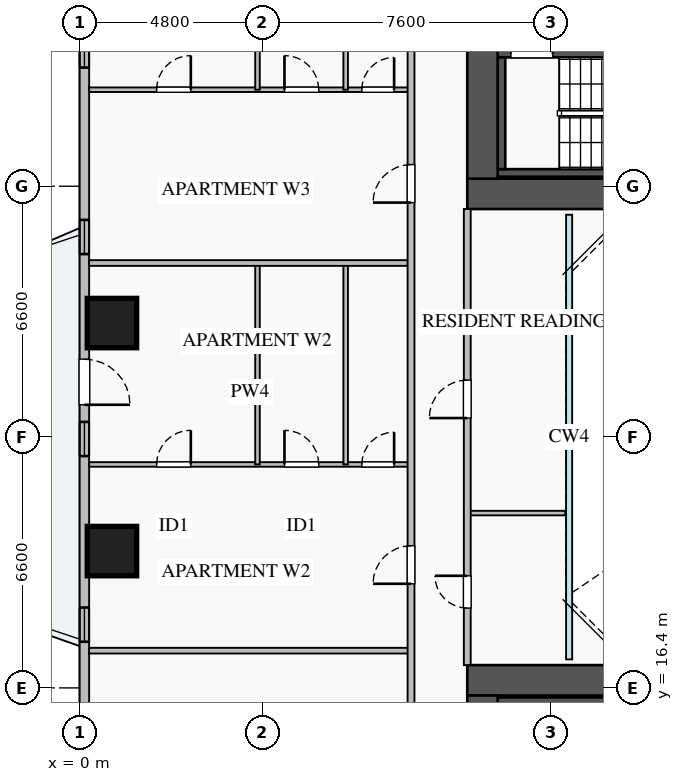
"""IFC4 building model, lengths in metres.
Left out: names, types, materials, properties, quantities, classifications, styles, units other than length and angle.
Written with IfcOpenShell. Run it as: python <this file> out.ifc"""

import sys

from ifc_helpers import new_model, si_unit, direction, frame, frame_2d, origin, origin_2d, place, context, subcontext, project, spatial, rectangle, extrude, source, transform, mapped, element, fill, save


model = new_model("IFC4")
c1 = context("Model", 3, precision=1e-05, world=origin(), true_north=direction((0.0, 1.0)))
c2 = subcontext(c1, "Body", "Model", "MODEL_VIEW")
j1 = project(units=[si_unit("LENGTHUNIT", "METRE"), si_unit("PLANEANGLEUNIT", "RADIAN")], contexts=[c1])
p1 = place(None, origin())
s1 = spatial("IfcSite", under=j1, at=p1, CompositionType="ELEMENT")
p2 = place(p1, origin())
s2 = spatial("IfcBuilding", under=s1, at=p2, CompositionType="ELEMENT")
p3 = place(p2, frame((0.0, 0.0, 42.5)))
s3 = spatial("IfcBuildingStorey", under=s2, at=p3, CompositionType="ELEMENT", Elevation=42.5)
p4 = place(p3, frame((12.68, 33.2, 0.0), z_axis=(0.0, 0.0, 1.0), x_axis=(1.0, 0.0, 0.0)))
e1 = element("IfcWall", 1, at=p4, inside=s3, PredefinedType="SHEAR", context=c2, shape_type="SweptSolid", body=[
    extrude(rectangle(XDim=1.94, YDim=0.18, at=frame_2d((0.97, 0.0))), origin(), (0.0, 0.0, 1.0), 3.03),
])
p5 = place(p3, frame((11.0, 29.95, 0.0), z_axis=(0.0, 0.0, 1.0), x_axis=(1.0, 0.0, 0.0)))
e2 = element("IfcWall", 2, at=p5, inside=s3, PredefinedType="SHEAR", context=c2, shape_type="SweptSolid", body=[
    extrude(rectangle(XDim=7.15, YDim=0.2, at=frame_2d((3.575, 0.0))), origin(), (0.0, 0.0, 1.0), 3.25),
])
p6 = place(p3, frame((11.0, 33.09, 0.0), z_axis=(0.0, 0.0, 1.0), x_axis=(1.0, 0.0, 0.0)))
e3 = element("IfcWall", 3, at=p6, inside=s3, PredefinedType="SHEAR", context=c2, shape_type="SweptSolid", body=[
    extrude(rectangle(XDim=7.15, YDim=0.2, at=frame_2d((3.575, 0.0))), origin(), (0.0, 0.0, 1.0), 3.25),
])
p7 = place(p6, frame((0.35, 0.0, 0.0)))
e4 = element("IfcOpeningElement", 4, at=p7, cuts=e3, PredefinedType="OPENING", context=c2, shape_type="SweptSolid", body=[
    extrude(rectangle(XDim=1.1, YDim=2.05, at=frame_2d((0.55, 1.025))), frame((0.0, 0.11, 0.0), z_axis=(0.0, -1.0, 0.0), x_axis=(1.0, 0.0, 0.0)), (0.0, 0.0, 1.0), 0.22),
])
p8 = place(p3, frame((11.1, 30.05, 0.0), z_axis=(0.0, 0.0, 1.0), x_axis=(0.0, 1.0, 0.0)))
e5 = element("IfcWall", 5, at=p8, inside=s3, PredefinedType="SHEAR", context=c2, shape_type="SweptSolid", body=[
    extrude(rectangle(XDim=2.94, YDim=0.2, at=frame_2d((1.47, 0.0))), origin(), (0.0, 0.0, 1.0), 3.25),
])
p9 = place(p3, frame((11.0, 16.05, 0.0), z_axis=(0.0, 0.0, 1.0), x_axis=(1.0, 0.0, 0.0)))
e6 = element("IfcWall", 6, at=p9, inside=s3, PredefinedType="SHEAR", context=c2, shape_type="SweptSolid", body=[
    extrude(rectangle(XDim=7.15, YDim=0.2, at=frame_2d((3.575, 0.0))), origin(), (0.0, 0.0, 1.0), 3.25),
])
p10 = place(p3, frame((10.2, 29.4, 0.0), z_axis=(0.0, 0.0, 1.0), x_axis=(1.0, 0.0, 0.0)))
e7 = element("IfcWall", 7, at=p10, inside=s3, PredefinedType="SHEAR", context=c2, shape_type="SweptSolid", body=[
    extrude(rectangle(XDim=17.6, YDim=0.8, at=frame_2d((8.8, 0.0))), origin(), (0.0, 0.0, 1.0), 3.25),
])
p11 = place(p3, frame((10.6, 29.8, 0.0), z_axis=(0.0, 0.0, 1.0), x_axis=(0.0, 1.0, 0.0)))
e8 = element("IfcWall", 8, at=p11, inside=s3, PredefinedType="SHEAR", context=c2, shape_type="SweptSolid", body=[
    extrude(rectangle(XDim=5.6, YDim=0.8, at=frame_2d((2.8, 0.0))), origin(), (0.0, 0.0, 1.0), 3.25),
])
p12 = place(p3, frame((10.2, 16.6, 0.0), z_axis=(0.0, 0.0, 1.0), x_axis=(1.0, 0.0, 0.0)))
e9 = element("IfcWall", 9, at=p12, inside=s3, PredefinedType="SHEAR", context=c2, shape_type="SweptSolid", body=[
    extrude(rectangle(XDim=17.6, YDim=0.8, at=frame_2d((8.8, 0.0))), origin(), (0.0, 0.0, 1.0), 3.25),
])
p13 = place(p3, frame((10.6, 10.6, 0.0), z_axis=(0.0, 0.0, 1.0), x_axis=(0.0, 1.0, 0.0)))
e10 = element("IfcWall", 10, at=p13, inside=s3, PredefinedType="SHEAR", context=c2, shape_type="SweptSolid", body=[
    extrude(rectangle(XDim=5.6, YDim=0.8, at=frame_2d((2.8, 0.0))), origin(), (0.0, 0.0, 1.0), 3.25),
])
m1 = source(origin(), c2, "Body", "SweptSolid", [
    extrude(rectangle(XDim=1.3, YDim=1.3, at=origin_2d()), origin(), (0.0, 0.0, 1.0), 3.25),
])
for number, where, z_axis, x_axis in (
    (11, (0.85, 26.0, 0.0), (0.0, 0.0, 1.0), (1.0, 0.0, 0.0)),
    (12, (0.85, 20.0, 0.0), (0.0, 0.0, 1.0), (1.0, 0.0, 0.0)),
):
    element("IfcColumn", number, at=place(p3, frame(where, z_axis=z_axis, x_axis=x_axis)), inside=s3, PredefinedType="COLUMN", context=c2, shape_type="MappedRepresentation", body=[
        mapped(m1, transform((0.0, 0.0, 0.0), x_axis=(1.0, 0.0, 0.0), y_axis=(0.0, 1.0, 0.0), z_axis=(0.0, 0.0, 1.0), scale=1.0)),
    ])
p14 = place(p3, frame((0.125, 9.45, 0.0), z_axis=(0.0, 0.0, 1.0), x_axis=(0.0, 1.0, 0.0)))
e13 = element("IfcWall", 13, at=p14, inside=s3, PredefinedType="STANDARD", context=c2, shape_type="SweptSolid", body=[
    extrude(rectangle(XDim=27.1, YDim=0.25, at=frame_2d((13.55, 0.0))), origin(), (0.0, 0.0, 1.0), 2.57),
])
p15 = place(p14, frame((14.4, 0.0, 0.0)))
e14 = element("IfcOpeningElement", 14, at=p15, cuts=e13, PredefinedType="OPENING", context=c2, shape_type="SweptSolid", body=[
    extrude(rectangle(XDim=1.2, YDim=2.1, at=frame_2d((0.6, 1.05))), frame((0.0, 0.135, 0.0), z_axis=(0.0, -1.0, 0.0), x_axis=(1.0, 0.0, 0.0)), (0.0, 0.0, 1.0), 0.27),
])
p16 = place(p14, frame((2.188, 0.0, 0.9)))
e15 = element("IfcOpeningElement", 15, at=p16, cuts=e13, PredefinedType="OPENING", context=c2, shape_type="SweptSolid", body=[
    extrude(rectangle(XDim=2.4, YDim=1.48, at=frame_2d((1.2, 0.74))), frame((0.0, 0.135, 0.0), z_axis=(0.0, -1.0, 0.0), x_axis=(1.0, 0.0, 0.0)), (0.0, 0.0, 1.0), 0.27),
])
p17 = place(p14, frame((23.272, 0.0, 0.9)))
e16 = element("IfcOpeningElement", 16, at=p17, cuts=e13, PredefinedType="OPENING", context=c2, shape_type="SweptSolid", body=[
    extrude(rectangle(XDim=2.1, YDim=1.5, at=frame_2d((1.05, 0.75))), frame((0.0, 0.135, 0.0), z_axis=(0.0, -1.0, 0.0), x_axis=(1.0, 0.0, 0.0)), (0.0, 0.0, 1.0), 0.27),
])
p18 = place(p14, frame((13.05, 0.0, 0.9)))
e17 = element("IfcOpeningElement", 17, at=p18, cuts=e13, PredefinedType="OPENING", context=c2, shape_type="SweptSolid", body=[
    extrude(rectangle(XDim=0.9, YDim=1.2, at=frame_2d((0.45, 0.6))), frame((0.0, 0.135, 0.0), z_axis=(0.0, -1.0, 0.0), x_axis=(1.0, 0.0, 0.0)), (0.0, 0.0, 1.0), 0.27),
])
p19 = place(p14, frame((8.165, 0.0, 0.9)))
e18 = element("IfcOpeningElement", 18, at=p19, cuts=e13, PredefinedType="OPENING", context=c2, shape_type="SweptSolid", body=[
    extrude(rectangle(XDim=0.9, YDim=1.2, at=frame_2d((0.45, 0.6))), frame((0.0, 0.135, 0.0), z_axis=(0.0, -1.0, 0.0), x_axis=(1.0, 0.0, 0.0)), (0.0, 0.0, 1.0), 0.27),
])
p20 = place(p14, frame((18.365, 0.0, 0.9)))
e19 = element("IfcOpeningElement", 19, at=p20, cuts=e13, PredefinedType="OPENING", context=c2, shape_type="SweptSolid", body=[
    extrude(rectangle(XDim=0.9, YDim=1.2, at=frame_2d((0.45, 0.6))), frame((0.0, 0.135, 0.0), z_axis=(0.0, -1.0, 0.0), x_axis=(1.0, 0.0, 0.0)), (0.0, 0.0, 1.0), 0.27),
])
p21 = place(p3, frame((0.25, 22.28, 0.0), z_axis=(0.0, 0.0, 1.0), x_axis=(1.0, 0.0, 0.0)))
e20 = element("IfcWall", 20, at=p21, inside=s3, PredefinedType="PLUMBINGWALL", context=c2, shape_type="SweptSolid", body=[
    extrude(rectangle(XDim=8.47, YDim=0.12, at=frame_2d((4.235, 0.0))), origin(), (0.0, 0.0, 1.0), 3.03),
])
p22 = place(p21, frame((1.775, 0.0, 0.0)))
e21 = element("IfcOpeningElement", 21, at=p22, cuts=e20, PredefinedType="OPENING", context=c2, shape_type="SweptSolid", body=[
    extrude(rectangle(XDim=0.9, YDim=2.05, at=frame_2d((0.45, 1.025))), frame((0.0, 0.07, 0.0), z_axis=(0.0, -1.0, 0.0), x_axis=(1.0, 0.0, 0.0)), (0.0, 0.0, 1.0), 0.14),
])
p23 = place(p21, frame((5.14, 0.0, 0.0)))
e22 = element("IfcOpeningElement", 22, at=p23, cuts=e20, PredefinedType="OPENING", context=c2, shape_type="SweptSolid", body=[
    extrude(rectangle(XDim=0.9, YDim=2.05, at=frame_2d((0.45, 1.025))), frame((0.0, 0.07, 0.0), z_axis=(0.0, -1.0, 0.0), x_axis=(1.0, 0.0, 0.0)), (0.0, 0.0, 1.0), 0.14),
])
p24 = place(p21, frame((7.175, 0.0, 0.0)))
e23 = element("IfcOpeningElement", 23, at=p24, cuts=e20, PredefinedType="OPENING", context=c2, shape_type="SweptSolid", body=[
    extrude(rectangle(XDim=0.85, YDim=2.05, at=frame_2d((0.425, 1.025))), frame((0.0, 0.07, 0.0), z_axis=(0.0, -1.0, 0.0), x_axis=(1.0, 0.0, 0.0)), (0.0, 0.0, 1.0), 0.14),
])
for number, where, z_axis, x_axis in (
    (24, (4.68, 22.28, 0.0), (0.0, 0.0, 1.0), (0.0, 1.0, 0.0)),
    (25, (7.0, 22.28, 0.0), (0.0, 0.0, 1.0), (0.0, 1.0, 0.0)),
):
    element("IfcWall", number, at=place(p3, frame(where, z_axis=z_axis, x_axis=x_axis)), inside=s3, PredefinedType="PLUMBINGWALL", context=c2, shape_type="SweptSolid", body=[
        extrude(rectangle(XDim=5.3, YDim=0.12, at=frame_2d((2.65, 0.0))), origin(), (0.0, 0.0, 1.0), 3.03),
    ])
p25 = place(p3, frame((0.25, 17.38, 0.0), z_axis=(0.0, 0.0, 1.0), x_axis=(1.0, 0.0, 0.0)))
e26 = element("IfcWall", 26, at=p25, inside=s3, PredefinedType="PARTITIONING", context=c2, shape_type="SweptSolid", body=[
    extrude(rectangle(XDim=8.47, YDim=0.15, at=frame_2d((4.235, 0.0))), origin(), (0.0, 0.0, 1.0), 3.03),
])
p26 = place(p3, frame((0.25, 32.14, 0.0), z_axis=(0.0, 0.0, 1.0), x_axis=(1.0, 0.0, 0.0)))
e27 = element("IfcWall", 27, at=p26, inside=s3, PredefinedType="PLUMBINGWALL", context=c2, shape_type="SweptSolid", body=[
    extrude(rectangle(XDim=8.47, YDim=0.12, at=frame_2d((4.235, 0.0))), origin(), (0.0, 0.0, 1.0), 3.03),
])
p27 = place(p26, frame((1.775, 0.0, 0.0)))
e28 = element("IfcOpeningElement", 28, at=p27, cuts=e27, PredefinedType="OPENING", context=c2, shape_type="SweptSolid", body=[
    extrude(rectangle(XDim=0.9, YDim=2.05, at=frame_2d((0.45, 1.025))), frame((0.0, 0.07, 0.0), z_axis=(0.0, -1.0, 0.0), x_axis=(1.0, 0.0, 0.0)), (0.0, 0.0, 1.0), 0.14),
])
p28 = place(p26, frame((5.14, 0.0, 0.0)))
e29 = element("IfcOpeningElement", 29, at=p28, cuts=e27, PredefinedType="OPENING", context=c2, shape_type="SweptSolid", body=[
    extrude(rectangle(XDim=0.9, YDim=2.05, at=frame_2d((0.45, 1.025))), frame((0.0, 0.07, 0.0), z_axis=(0.0, -1.0, 0.0), x_axis=(1.0, 0.0, 0.0)), (0.0, 0.0, 1.0), 0.14),
])
p29 = place(p26, frame((7.175, 0.0, 0.0)))
e30 = element("IfcOpeningElement", 30, at=p29, cuts=e27, PredefinedType="OPENING", context=c2, shape_type="SweptSolid", body=[
    extrude(rectangle(XDim=0.85, YDim=2.05, at=frame_2d((0.425, 1.025))), frame((0.0, 0.07, 0.0), z_axis=(0.0, -1.0, 0.0), x_axis=(1.0, 0.0, 0.0)), (0.0, 0.0, 1.0), 0.14),
])
for number, where, z_axis, x_axis in (
    (31, (4.68, 32.14, 0.0), (0.0, 0.0, 1.0), (0.0, 1.0, 0.0)),
    (32, (7.0, 32.14, 0.0), (0.0, 0.0, 1.0), (0.0, 1.0, 0.0)),
):
    element("IfcWall", number, at=place(p3, frame(where, z_axis=z_axis, x_axis=x_axis)), inside=s3, PredefinedType="PLUMBINGWALL", context=c2, shape_type="SweptSolid", body=[
        extrude(rectangle(XDim=4.94, YDim=0.12, at=frame_2d((2.47, 0.0))), origin(), (0.0, 0.0, 1.0), 3.03),
    ])
p30 = place(p3, frame((0.25, 27.58, 0.0), z_axis=(0.0, 0.0, 1.0), x_axis=(1.0, 0.0, 0.0)))
e33 = element("IfcWall", 33, at=p30, inside=s3, PredefinedType="PARTITIONING", context=c2, shape_type="SweptSolid", body=[
    extrude(rectangle(XDim=8.47, YDim=0.15, at=frame_2d((4.235, 0.0))), origin(), (0.0, 0.0, 1.0), 2.731),
])
p31 = place(p3, frame((8.72, 7.21, 0.0), z_axis=(0.0, 0.0, 1.0), x_axis=(0.0, 1.0, 0.0)))
e34 = element("IfcWall", 34, at=p31, inside=s3, PredefinedType="PARTITIONING", context=c2, shape_type="SweptSolid", body=[
    extrude(rectangle(XDim=31.23, YDim=0.18, at=frame_2d((15.615, 0.0))), origin(), (0.0, 0.0, 1.0), 3.03),
])
p32 = place(p31, frame((30.09, 0.0, 0.0)))
e35 = element("IfcOpeningElement", 35, at=p32, cuts=e34, PredefinedType="OPENING", context=c2, shape_type="SweptSolid", body=[
    extrude(rectangle(XDim=0.9, YDim=2.05, at=frame_2d((0.45, 1.025))), frame((0.0, 0.1, 0.0), z_axis=(0.0, -1.0, 0.0), x_axis=(1.0, 0.0, 0.0)), (0.0, 0.0, 1.0), 0.2),
])
p33 = place(p31, frame((0.24, 0.0, 0.0)))
e36 = element("IfcOpeningElement", 36, at=p33, cuts=e34, PredefinedType="OPENING", context=c2, shape_type="SweptSolid", body=[
    extrude(rectangle(XDim=0.9, YDim=2.05, at=frame_2d((0.45, 1.025))), frame((0.0, 0.1, 0.0), z_axis=(0.0, -1.0, 0.0), x_axis=(1.0, 0.0, 0.0)), (0.0, 0.0, 1.0), 0.2),
])
p34 = place(p31, frame((5.265, 0.0, 0.0)))
e37 = element("IfcOpeningElement", 37, at=p34, cuts=e34, PredefinedType="OPENING", context=c2, shape_type="SweptSolid", body=[
    extrude(rectangle(XDim=1.0, YDim=2.05, at=frame_2d((0.5, 1.025))), frame((0.0, 0.1, 0.0), z_axis=(0.0, -1.0, 0.0), x_axis=(1.0, 0.0, 0.0)), (0.0, 0.0, 1.0), 0.2),
])
p35 = place(p31, frame((11.93, 0.0, 0.0)))
e38 = element("IfcOpeningElement", 38, at=p35, cuts=e34, PredefinedType="OPENING", context=c2, shape_type="SweptSolid", body=[
    extrude(rectangle(XDim=1.0, YDim=2.05, at=frame_2d((0.5, 1.025))), frame((0.0, 0.1, 0.0), z_axis=(0.0, -1.0, 0.0), x_axis=(1.0, 0.0, 0.0)), (0.0, 0.0, 1.0), 0.2),
])
p36 = place(p31, frame((21.96, 0.0, 0.0)))
e39 = element("IfcOpeningElement", 39, at=p36, cuts=e34, PredefinedType="OPENING", context=c2, shape_type="SweptSolid", body=[
    extrude(rectangle(XDim=1.0, YDim=2.05, at=frame_2d((0.5, 1.025))), frame((0.0, 0.1, 0.0), z_axis=(0.0, -1.0, 0.0), x_axis=(1.0, 0.0, 0.0)), (0.0, 0.0, 1.0), 0.2),
])
p37 = place(p3, frame((10.2, 21.0, 0.0), z_axis=(0.0, 0.0, 1.0), x_axis=(1.0, 0.0, 0.0)))
e40 = element("IfcWall", 40, at=p37, inside=s3, PredefinedType="PLUMBINGWALL", context=c2, shape_type="SweptSolid", body=[
    extrude(rectangle(XDim=2.58, YDim=0.12, at=frame_2d((1.29, 0.0))), origin(), (0.0, 0.0, 1.0), 3.03),
])
p38 = place(p3, frame((10.2, 17.0, 0.0), z_axis=(0.0, 0.0, 1.0), x_axis=(0.0, 1.0, 0.0)))
e41 = element("IfcWall", 41, at=p38, inside=s3, PredefinedType="PARTITIONING", context=c2, shape_type="SweptSolid", body=[
    extrude(rectangle(XDim=12.0, YDim=0.18, at=frame_2d((6.0, 0.0))), origin(), (0.0, 0.0, 1.0), 3.03),
])
p39 = place(p38, frame((1.5, 0.0, 0.0)))
e42 = element("IfcOpeningElement", 42, at=p39, cuts=e41, PredefinedType="OPENING", context=c2, shape_type="SweptSolid", body=[
    extrude(rectangle(XDim=0.85, YDim=2.05, at=frame_2d((0.425, 1.025))), frame((0.0, 0.1, 0.0), z_axis=(0.0, -1.0, 0.0), x_axis=(1.0, 0.0, 0.0)), (0.0, 0.0, 1.0), 0.2),
])
p40 = place(p38, frame((6.5, 0.0, 0.0)))
e43 = element("IfcOpeningElement", 43, at=p40, cuts=e41, PredefinedType="OPENING", context=c2, shape_type="SweptSolid", body=[
    extrude(rectangle(XDim=1.0, YDim=2.05, at=frame_2d((0.5, 1.025))), frame((0.0, 0.1, 0.0), z_axis=(0.0, -1.0, 0.0), x_axis=(1.0, 0.0, 0.0)), (0.0, 0.0, 1.0), 0.2),
])
m2 = source(origin(), c2, "Body", "SweptSolid", [
    extrude(rectangle(XDim=1.2, YDim=2.1, at=frame_2d((0.6, 1.05))), frame((0.0, 0.025, 0.0), z_axis=(0.0, -1.0, 0.0), x_axis=(1.0, 0.0, 0.0)), (0.0, 0.0, 1.0), 0.05),
])
p41 = place(p15, frame((1.2, 0.0, 0.0), z_axis=(0.0, 0.0, 1.0), x_axis=(-1.0, 0.0, 0.0)))
e44 = element("IfcDoor", 44, at=p41, inside=s3, OperationType="SINGLE_SWING_LEFT", PredefinedType="DOOR", context=c2, shape_type="MappedRepresentation", body=[
    mapped(m2, transform((0.0, 0.0, 0.0), x_axis=(1.0, 0.0, 0.0), y_axis=(0.0, 1.0, 0.0), z_axis=(0.0, 0.0, 1.0), scale=1.0)),
])
fill(e14, e44)
m3 = source(origin(), c2, "Body", "SweptSolid", [
    extrude(rectangle(XDim=2.1, YDim=1.5, at=frame_2d((1.05, 0.75))), frame((0.0, 0.03, 0.0), z_axis=(0.0, -1.0, 0.0), x_axis=(1.0, 0.0, 0.0)), (0.0, 0.0, 1.0), 0.06),
])
p42 = place(p17, origin())
e45 = element("IfcWindow", 45, at=p42, inside=s3, PartitioningType="TRIPLE_PANEL_VERTICAL", PredefinedType="WINDOW", context=c2, shape_type="MappedRepresentation", body=[
    mapped(m3, transform((0.0, 0.0, 0.0), x_axis=(1.0, 0.0, 0.0), y_axis=(0.0, 1.0, 0.0), z_axis=(0.0, 0.0, 1.0), scale=1.0)),
])
fill(e16, e45)
m4 = source(origin(), c2, "Body", "SweptSolid", [
    extrude(rectangle(XDim=1.1, YDim=2.05, at=frame_2d((0.55, 1.025))), frame((0.0, 0.025, 0.0), z_axis=(0.0, -1.0, 0.0), x_axis=(1.0, 0.0, 0.0)), (0.0, 0.0, 1.0), 0.05),
])
p43 = place(p7, origin())
e46 = element("IfcDoor", 46, at=p43, inside=s3, OperationType="SINGLE_SWING_RIGHT", PredefinedType="DOOR", context=c2, shape_type="MappedRepresentation", body=[
    mapped(m4, transform((0.0, 0.0, 0.0), x_axis=(1.0, 0.0, 0.0), y_axis=(0.0, 1.0, 0.0), z_axis=(0.0, 0.0, 1.0), scale=1.0)),
])
fill(e4, e46)
m5 = source(origin(), c2, "Body", "SweptSolid", [
    extrude(rectangle(XDim=0.9, YDim=2.05, at=frame_2d((0.45, 1.025))), frame((0.0, 0.025, 0.0), z_axis=(0.0, -1.0, 0.0), x_axis=(1.0, 0.0, 0.0)), (0.0, 0.0, 1.0), 0.05),
])
p44 = place(p22, origin())
e47 = element("IfcDoor", 47, at=p44, inside=s3, OperationType="SINGLE_SWING_RIGHT", PredefinedType="DOOR", context=c2, shape_type="MappedRepresentation", body=[
    mapped(m5, transform((0.0, 0.0, 0.0), x_axis=(1.0, 0.0, 0.0), y_axis=(0.0, 1.0, 0.0), z_axis=(0.0, 0.0, 1.0), scale=1.0)),
])
fill(e21, e47)
p45 = place(p23, origin())
e48 = element("IfcDoor", 48, at=p45, inside=s3, OperationType="SINGLE_SWING_LEFT", PredefinedType="DOOR", context=c2, shape_type="MappedRepresentation", body=[
    mapped(m5, transform((0.0, 0.0, 0.0), x_axis=(1.0, 0.0, 0.0), y_axis=(0.0, 1.0, 0.0), z_axis=(0.0, 0.0, 1.0), scale=1.0)),
])
fill(e22, e48)
m6 = source(origin(), c2, "Body", "SweptSolid", [
    extrude(rectangle(XDim=0.85, YDim=2.05, at=frame_2d((0.425, 1.025))), frame((0.0, 0.025, 0.0), z_axis=(0.0, -1.0, 0.0), x_axis=(1.0, 0.0, 0.0)), (0.0, 0.0, 1.0), 0.05),
])
p46 = place(p24, origin())
e49 = element("IfcDoor", 49, at=p46, inside=s3, OperationType="SINGLE_SWING_RIGHT", PredefinedType="DOOR", context=c2, shape_type="MappedRepresentation", body=[
    mapped(m6, transform((0.0, 0.0, 0.0), x_axis=(1.0, 0.0, 0.0), y_axis=(0.0, 1.0, 0.0), z_axis=(0.0, 0.0, 1.0), scale=1.0)),
])
fill(e23, e49)
p47 = place(p27, origin())
e50 = element("IfcDoor", 50, at=p47, inside=s3, OperationType="SINGLE_SWING_RIGHT", PredefinedType="DOOR", context=c2, shape_type="MappedRepresentation", body=[
    mapped(m5, transform((0.0, 0.0, 0.0), x_axis=(1.0, 0.0, 0.0), y_axis=(0.0, 1.0, 0.0), z_axis=(0.0, 0.0, 1.0), scale=1.0)),
])
fill(e28, e50)
p48 = place(p28, origin())
e51 = element("IfcDoor", 51, at=p48, inside=s3, OperationType="SINGLE_SWING_LEFT", PredefinedType="DOOR", context=c2, shape_type="MappedRepresentation", body=[
    mapped(m5, transform((0.0, 0.0, 0.0), x_axis=(1.0, 0.0, 0.0), y_axis=(0.0, 1.0, 0.0), z_axis=(0.0, 0.0, 1.0), scale=1.0)),
])
fill(e29, e51)
p49 = place(p29, origin())
e52 = element("IfcDoor", 52, at=p49, inside=s3, OperationType="SINGLE_SWING_RIGHT", PredefinedType="DOOR", context=c2, shape_type="MappedRepresentation", body=[
    mapped(m6, transform((0.0, 0.0, 0.0), x_axis=(1.0, 0.0, 0.0), y_axis=(0.0, 1.0, 0.0), z_axis=(0.0, 0.0, 1.0), scale=1.0)),
])
fill(e30, e52)
m7 = source(origin(), c2, "Body", "SweptSolid", [
    extrude(rectangle(XDim=1.0, YDim=2.05, at=frame_2d((0.5, 1.025))), frame((0.0, 0.025, 0.0), z_axis=(0.0, -1.0, 0.0), x_axis=(1.0, 0.0, 0.0)), (0.0, 0.0, 1.0), 0.05),
])
p50 = place(p35, origin())
e53 = element("IfcDoor", 53, at=p50, inside=s3, OperationType="SINGLE_SWING_LEFT", PredefinedType="DOOR", context=c2, shape_type="MappedRepresentation", body=[
    mapped(m7, transform((0.0, 0.0, 0.0), x_axis=(1.0, 0.0, 0.0), y_axis=(0.0, 1.0, 0.0), z_axis=(0.0, 0.0, 1.0), scale=1.0)),
])
fill(e38, e53)
p51 = place(p36, origin())
e54 = element("IfcDoor", 54, at=p51, inside=s3, OperationType="SINGLE_SWING_LEFT", PredefinedType="DOOR", context=c2, shape_type="MappedRepresentation", body=[
    mapped(m7, transform((0.0, 0.0, 0.0), x_axis=(1.0, 0.0, 0.0), y_axis=(0.0, 1.0, 0.0), z_axis=(0.0, 0.0, 1.0), scale=1.0)),
])
fill(e39, e54)
p52 = place(p39, origin())
e55 = element("IfcDoor", 55, at=p52, inside=s3, OperationType="SINGLE_SWING_RIGHT", PredefinedType="DOOR", context=c2, shape_type="MappedRepresentation", body=[
    mapped(m6, transform((0.0, 0.0, 0.0), x_axis=(1.0, 0.0, 0.0), y_axis=(0.0, 1.0, 0.0), z_axis=(0.0, 0.0, 1.0), scale=1.0)),
])
fill(e42, e55)
p53 = place(p40, origin())
e56 = element("IfcDoor", 56, at=p53, inside=s3, OperationType="SINGLE_SWING_LEFT", PredefinedType="DOOR", context=c2, shape_type="MappedRepresentation", body=[
    mapped(m7, transform((0.0, 0.0, 0.0), x_axis=(1.0, 0.0, 0.0), y_axis=(0.0, 1.0, 0.0), z_axis=(0.0, 0.0, 1.0), scale=1.0)),
])
fill(e43, e56)
m8 = source(origin(), c2, "Body", "SweptSolid", [
    extrude(rectangle(XDim=0.9, YDim=1.2, at=frame_2d((0.45, 0.6))), frame((0.0, 0.03, 0.0), z_axis=(0.0, -1.0, 0.0), x_axis=(1.0, 0.0, 0.0)), (0.0, 0.0, 1.0), 0.06),
])
p54 = place(p18, origin())
e57 = element("IfcWindow", 57, at=p54, inside=s3, PartitioningType="SINGLE_PANEL", PredefinedType="WINDOW", context=c2, shape_type="MappedRepresentation", body=[
    mapped(m8, transform((0.0, 0.0, 0.0), x_axis=(1.0, 0.0, 0.0), y_axis=(0.0, 1.0, 0.0), z_axis=(0.0, 0.0, 1.0), scale=1.0)),
])
fill(e17, e57)
p55 = place(p19, origin())
e58 = element("IfcWindow", 58, at=p55, inside=s3, PartitioningType="SINGLE_PANEL", PredefinedType="WINDOW", context=c2, shape_type="MappedRepresentation", body=[
    mapped(m8, transform((0.0, 0.0, 0.0), x_axis=(1.0, 0.0, 0.0), y_axis=(0.0, 1.0, 0.0), z_axis=(0.0, 0.0, 1.0), scale=1.0)),
])
fill(e18, e58)
p56 = place(p20, origin())
e59 = element("IfcWindow", 59, at=p56, inside=s3, PartitioningType="SINGLE_PANEL", PredefinedType="WINDOW", context=c2, shape_type="MappedRepresentation", body=[
    mapped(m8, transform((0.0, 0.0, 0.0), x_axis=(1.0, 0.0, 0.0), y_axis=(0.0, 1.0, 0.0), z_axis=(0.0, 0.0, 1.0), scale=1.0)),
])
fill(e19, e59)
save(model, sys.argv[1])
